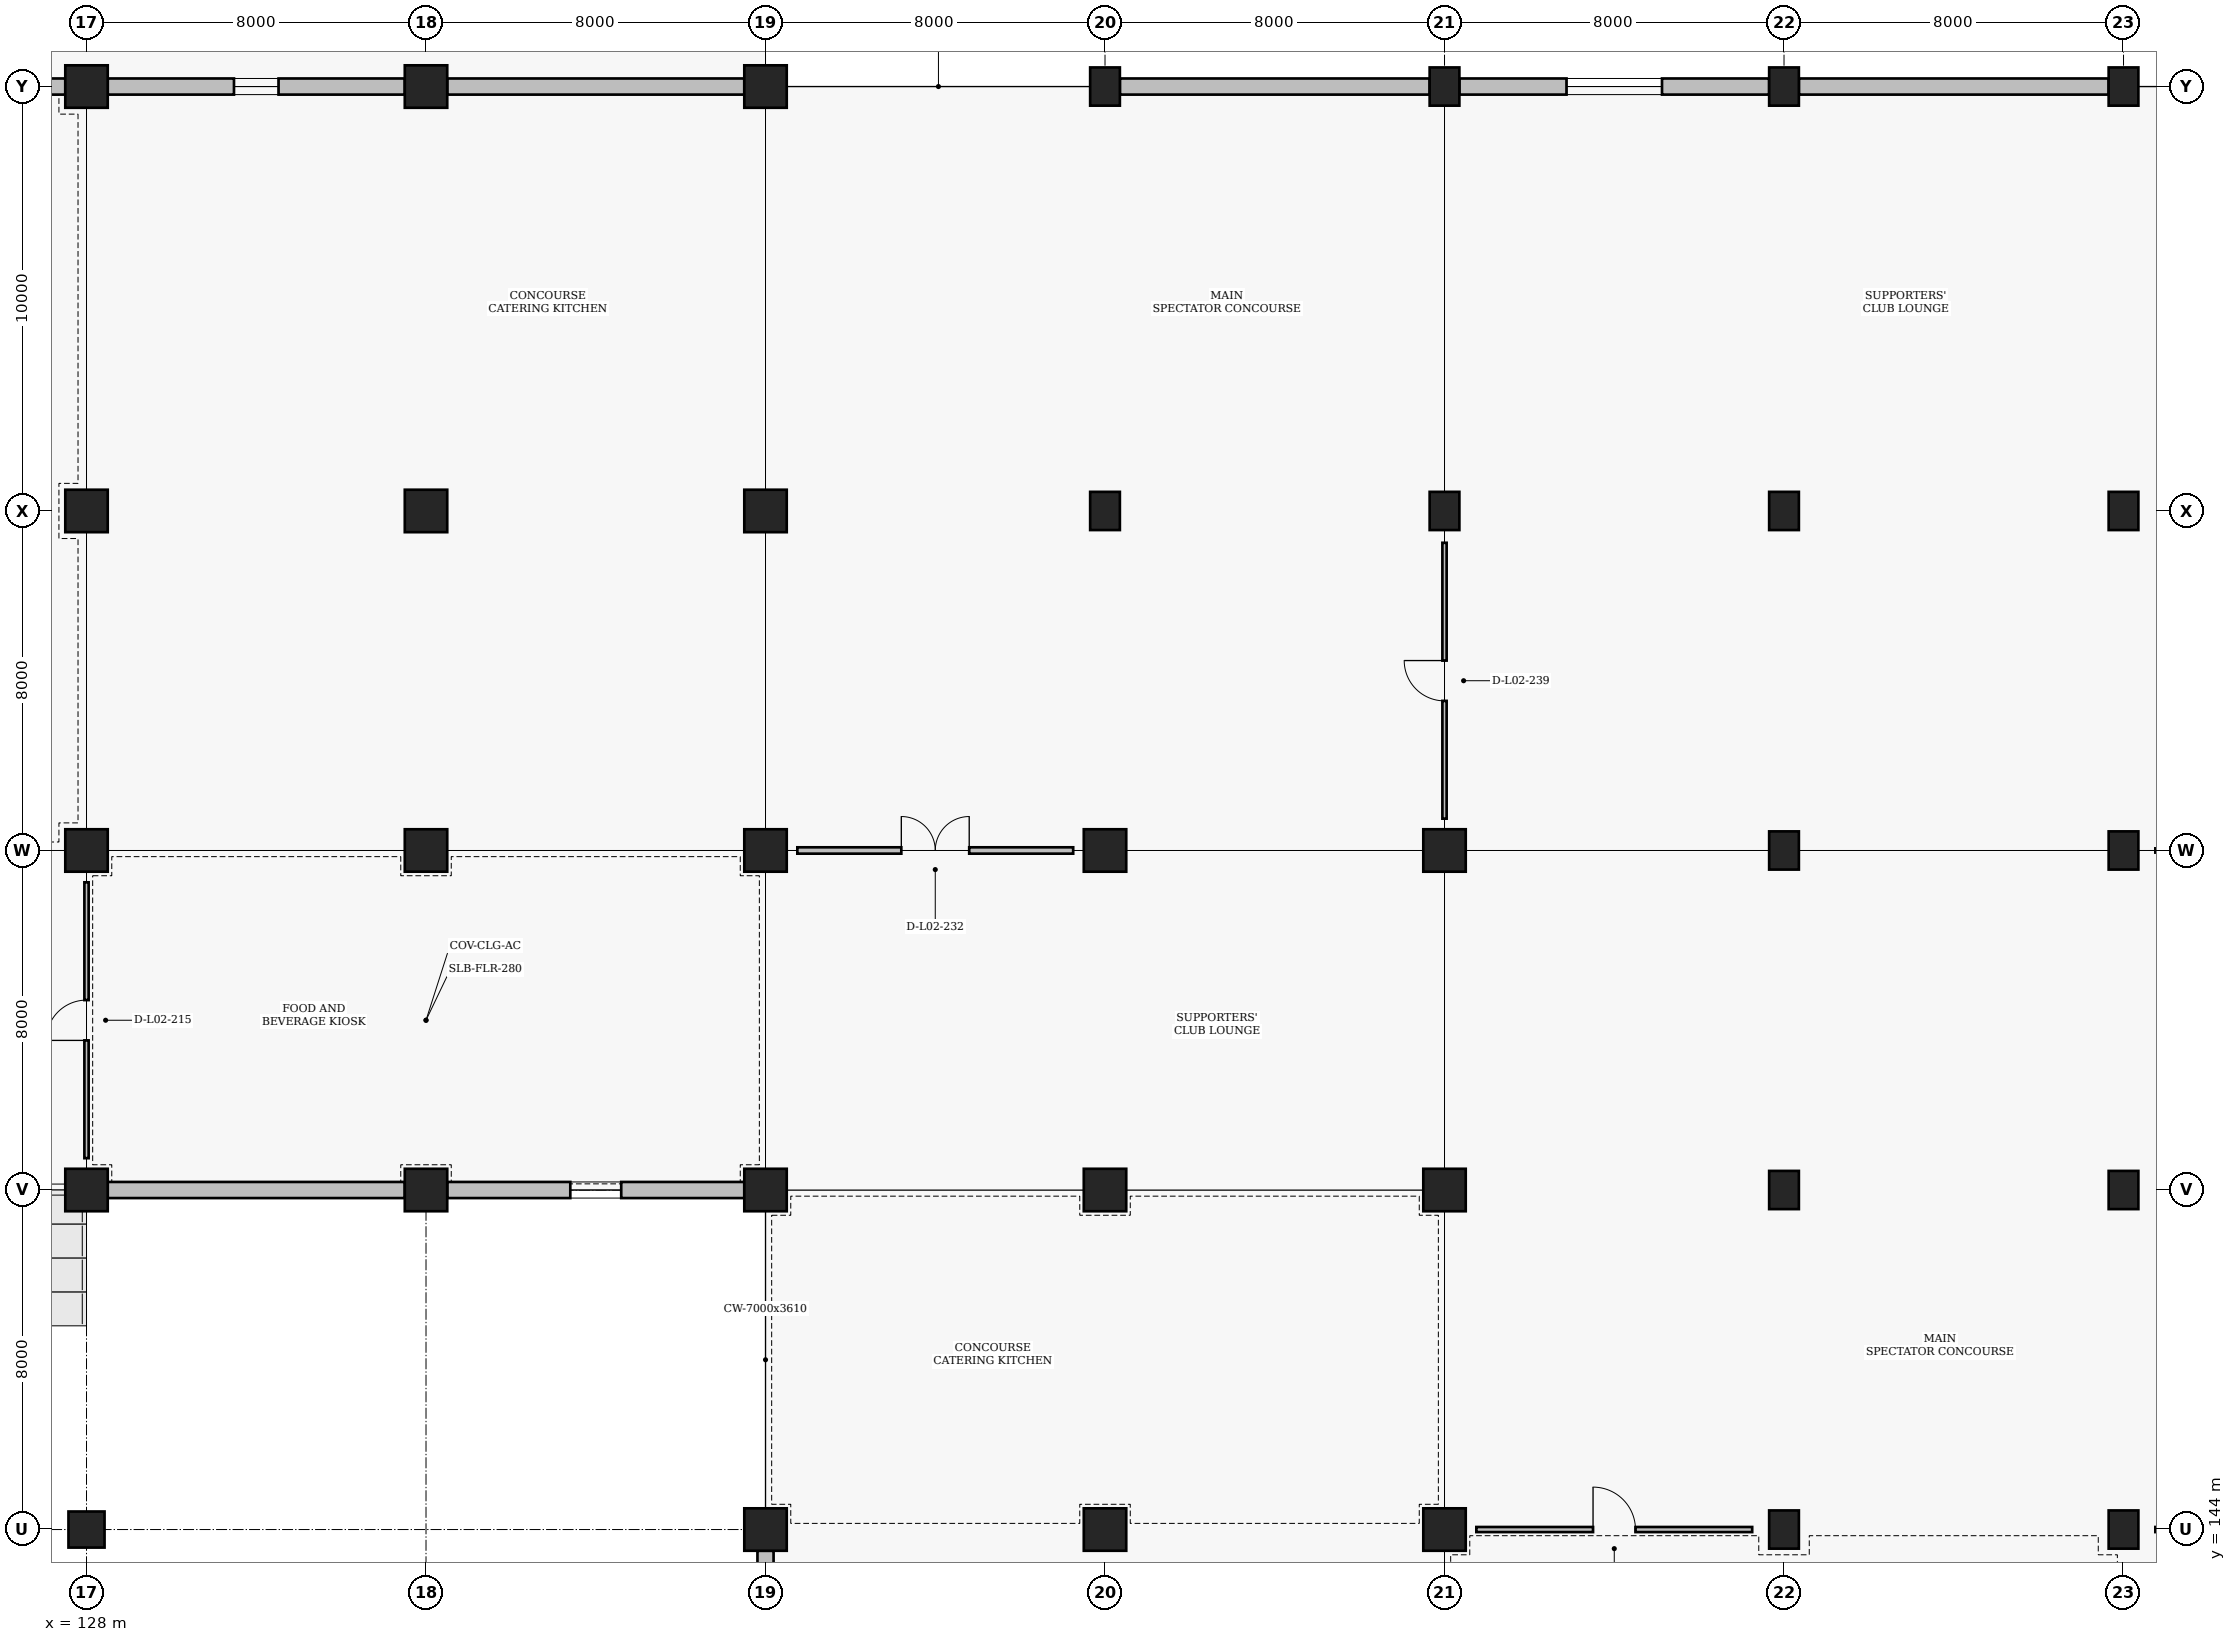
"""IFC4 building model, lengths in metres.
Left out: names, types, materials, properties, quantities, classifications, styles, units other than length and angle.
Written with IfcOpenShell. Run it as: python <this file> out.ifc"""

import sys

from ifc_helpers import new_model, si_unit, direction, frame, frame_2d, origin, origin_2d, place, context, subcontext, project, spatial, rectangle, circle, extrude, element, fill, save


model = new_model("IFC4")
c1 = context("Model", 3, precision=1e-05, world=origin(), true_north=direction((0.0, 1.0)))
c2 = subcontext(c1, "Body", "Model", "MODEL_VIEW")
j1 = project(units=[si_unit("LENGTHUNIT", "METRE"), si_unit("PLANEANGLEUNIT", "RADIAN")], contexts=[c1])
p1 = place(None, origin())
s1 = spatial("IfcSite", under=j1, at=p1, CompositionType="ELEMENT")
p2 = place(p1, origin())
s2 = spatial("IfcBuilding", under=s1, at=p2, CompositionType="ELEMENT")
p3 = place(p2, frame((0.0, 0.0, 4.8)))
s3 = spatial("IfcBuildingStorey", under=s2, at=p3, CompositionType="ELEMENT", Elevation=4.8)
for number, where, z_axis, x_axis in (
    (1, (128.0, 152.0, 0.0), (0.0, 0.0, 1.0), (1.0, 0.0, 0.0)),
    (2, (128.0, 160.0, 0.0), (0.0, 0.0, 1.0), (1.0, 0.0, 0.0)),
    (3, (128.0, 168.0, 0.0), (0.0, 0.0, 1.0), (1.0, 0.0, 0.0)),
    (4, (128.0, 178.0, 0.0), (0.0, 0.0, 1.0), (1.0, 0.0, 0.0)),
    (5, (136.0, 152.0, 0.0), (0.0, 0.0, 1.0), (1.0, 0.0, 0.0)),
    (6, (136.0, 160.0, 0.0), (0.0, 0.0, 1.0), (1.0, 0.0, 0.0)),
    (7, (136.0, 168.0, 0.0), (0.0, 0.0, 1.0), (1.0, 0.0, 0.0)),
    (8, (136.0, 178.0, 0.0), (0.0, 0.0, 1.0), (1.0, 0.0, 0.0)),
    (9, (144.0, 144.0, 0.0), (0.0, 0.0, 1.0), (1.0, 0.0, 0.0)),
    (10, (144.0, 152.0, 0.0), (0.0, 0.0, 1.0), (1.0, 0.0, 0.0)),
    (11, (144.0, 160.0, 0.0), (0.0, 0.0, 1.0), (1.0, 0.0, 0.0)),
    (12, (144.0, 168.0, 0.0), (0.0, 0.0, 1.0), (1.0, 0.0, 0.0)),
    (13, (144.0, 178.0, 0.0), (0.0, 0.0, 1.0), (1.0, 0.0, 0.0)),
    (14, (152.0, 144.0, 0.0), (0.0, 0.0, 1.0), (1.0, 0.0, 0.0)),
    (15, (152.0, 152.0, 0.0), (0.0, 0.0, 1.0), (1.0, 0.0, 0.0)),
    (16, (152.0, 160.0, 0.0), (0.0, 0.0, 1.0), (1.0, 0.0, 0.0)),
):
    element("IfcColumn", number, at=place(p3, frame(where, z_axis=z_axis, x_axis=x_axis)), inside=s3, PredefinedType="COLUMN", context=c2, shape_type="SweptSolid", body=[
        extrude(rectangle(XDim=1.0, YDim=1.0, at=origin_2d()), origin(), (0.0, 0.0, 1.0), 4.8),
    ])
for number, where, z_axis, x_axis in (
    (17, (152.0, 168.0, 0.0), (0.0, 0.0, 1.0), (1.0, 0.0, 0.0)),
    (18, (152.0, 178.0, 0.0), (0.0, 0.0, 1.0), (1.0, 0.0, 0.0)),
):
    element("IfcColumn", number, at=place(p3, frame(where, z_axis=z_axis, x_axis=x_axis)), inside=s3, PredefinedType="COLUMN", context=c2, shape_type="SweptSolid", body=[
        extrude(rectangle(XDim=0.7, YDim=0.9, at=origin_2d()), origin(), (0.0, 0.0, 1.0), 4.8),
    ])
for number, where, z_axis, x_axis in (
    (19, (160.0, 144.0, 0.0), (0.0, 0.0, 1.0), (1.0, 0.0, 0.0)),
    (20, (160.0, 152.0, 0.0), (0.0, 0.0, 1.0), (1.0, 0.0, 0.0)),
    (21, (160.0, 160.0, 0.0), (0.0, 0.0, 1.0), (1.0, 0.0, 0.0)),
):
    element("IfcColumn", number, at=place(p3, frame(where, z_axis=z_axis, x_axis=x_axis)), inside=s3, PredefinedType="COLUMN", context=c2, shape_type="SweptSolid", body=[
        extrude(rectangle(XDim=1.0, YDim=1.0, at=origin_2d()), origin(), (0.0, 0.0, 1.0), 4.8),
    ])
for number, where, z_axis, x_axis in (
    (22, (160.0, 168.0, 0.0), (0.0, 0.0, 1.0), (1.0, 0.0, 0.0)),
    (23, (160.0, 178.0, 0.0), (0.0, 0.0, 1.0), (1.0, 0.0, 0.0)),
    (24, (168.0, 144.0, 0.0), (0.0, 0.0, 1.0), (1.0, 0.0, 0.0)),
    (25, (168.0, 152.0, 0.0), (0.0, 0.0, 1.0), (1.0, 0.0, 0.0)),
    (26, (168.0, 160.0, 0.0), (0.0, 0.0, 1.0), (1.0, 0.0, 0.0)),
    (27, (168.0, 168.0, 0.0), (0.0, 0.0, 1.0), (1.0, 0.0, 0.0)),
    (28, (168.0, 178.0, 0.0), (0.0, 0.0, 1.0), (1.0, 0.0, 0.0)),
    (29, (176.0, 144.0, 0.0), (0.0, 0.0, 1.0), (1.0, 0.0, 0.0)),
    (30, (176.0, 152.0, 0.0), (0.0, 0.0, 1.0), (1.0, 0.0, 0.0)),
    (31, (176.0, 160.0, 0.0), (0.0, 0.0, 1.0), (1.0, 0.0, 0.0)),
    (32, (176.0, 168.0, 0.0), (0.0, 0.0, 1.0), (1.0, 0.0, 0.0)),
    (33, (176.0, 178.0, 0.0), (0.0, 0.0, 1.0), (1.0, 0.0, 0.0)),
):
    element("IfcColumn", number, at=place(p3, frame(where, z_axis=z_axis, x_axis=x_axis)), inside=s3, PredefinedType="COLUMN", context=c2, shape_type="SweptSolid", body=[
        extrude(rectangle(XDim=0.7, YDim=0.9, at=origin_2d()), origin(), (0.0, 0.0, 1.0), 4.8),
    ])
p4 = place(p3, frame((128.0, 144.0, 0.0), z_axis=(0.0, 0.0, 1.0), x_axis=(1.0, 0.0, 0.0)))
e34 = element("IfcColumn", 34, at=p4, inside=s3, PredefinedType="COLUMN", context=c2, shape_type="SweptSolid", body=[
    extrude(circle(Radius=0.425, at=origin_2d()), origin(), (0.0, 0.0, 1.0), 4.8),
])
p5 = place(p3, frame((120.5, 178.0, 0.0), z_axis=(0.0, 0.0, 1.0), x_axis=(1.0, 0.0, 0.0)))
e35 = element("IfcWall", 35, at=p5, inside=s3, PredefinedType="SOLIDWALL", context=c2, shape_type="SweptSolid", body=[
    extrude(rectangle(XDim=7.0, YDim=0.38, at=frame_2d((3.5, 0.0))), origin(), (0.0, 0.0, 1.0), 3.77),
])
p6 = place(p3, frame((128.5, 152.0, 0.0), z_axis=(0.0, 0.0, 1.0), x_axis=(1.0, 0.0, 0.0)))
e36 = element("IfcWall", 36, at=p6, inside=s3, PredefinedType="SOLIDWALL", context=c2, shape_type="SweptSolid", body=[
    extrude(rectangle(XDim=7.0, YDim=0.38, at=frame_2d((3.5, 0.0))), origin(), (0.0, 0.0, 1.0), 3.91),
])
p7 = place(p3, frame((128.5, 178.0, 0.0), z_axis=(0.0, 0.0, 1.0), x_axis=(1.0, 0.0, 0.0)))
e37 = element("IfcWall", 37, at=p7, inside=s3, PredefinedType="SOLIDWALL", context=c2, shape_type="SweptSolid", body=[
    extrude(rectangle(XDim=7.0, YDim=0.38, at=frame_2d((3.5, 0.0))), origin(), (0.0, 0.0, 1.0), 3.77),
])
p8 = place(p7, frame((2.975, 0.0, 0.95)))
e38 = element("IfcOpeningElement", 38, at=p8, cuts=e37, PredefinedType="OPENING", context=c2, shape_type="SweptSolid", body=[
    extrude(rectangle(XDim=1.05, YDim=1.5, at=frame_2d((0.525, 0.75))), frame((0.0, 0.2, 0.0), z_axis=(0.0, -1.0, 0.0), x_axis=(1.0, 0.0, 0.0)), (0.0, 0.0, 1.0), 0.4),
])
p9 = place(p3, frame((136.5, 152.0, 0.0), z_axis=(0.0, 0.0, 1.0), x_axis=(1.0, 0.0, 0.0)))
e39 = element("IfcWall", 39, at=p9, inside=s3, PredefinedType="SOLIDWALL", context=c2, shape_type="SweptSolid", body=[
    extrude(rectangle(XDim=7.0, YDim=0.38, at=frame_2d((3.5, 0.0))), origin(), (0.0, 0.0, 1.0), 3.91),
])
p10 = place(p9, frame((2.9, 0.0, 0.95)))
e40 = element("IfcOpeningElement", 40, at=p10, cuts=e39, PredefinedType="OPENING", context=c2, shape_type="SweptSolid", body=[
    extrude(rectangle(XDim=1.2, YDim=1.5, at=frame_2d((0.6, 0.75))), frame((0.0, 0.2, 0.0), z_axis=(0.0, -1.0, 0.0), x_axis=(1.0, 0.0, 0.0)), (0.0, 0.0, 1.0), 0.4),
])
p11 = place(p3, frame((136.5, 178.0, 0.0), z_axis=(0.0, 0.0, 1.0), x_axis=(1.0, 0.0, 0.0)))
e41 = element("IfcWall", 41, at=p11, inside=s3, PredefinedType="SOLIDWALL", context=c2, shape_type="SweptSolid", body=[
    extrude(rectangle(XDim=7.0, YDim=0.38, at=frame_2d((3.5, 0.0))), origin(), (0.0, 0.0, 1.0), 3.77),
])
p12 = place(p3, frame((144.0, 136.5, 0.0), z_axis=(0.0, 0.0, 1.0), x_axis=(0.0, 1.0, 0.0)))
e42 = element("IfcWall", 42, at=p12, inside=s3, PredefinedType="SOLIDWALL", context=c2, shape_type="SweptSolid", body=[
    extrude(rectangle(XDim=7.0, YDim=0.38, at=frame_2d((3.5, 0.0))), origin(), (0.0, 0.0, 1.0), 3.61),
])
p13 = place(p3, frame((152.35, 178.0, 0.0), z_axis=(0.0, 0.0, 1.0), x_axis=(1.0, 0.0, 0.0)))
e43 = element("IfcWall", 43, at=p13, inside=s3, PredefinedType="SOLIDWALL", context=c2, shape_type="SweptSolid", body=[
    extrude(rectangle(XDim=7.3, YDim=0.38, at=frame_2d((3.65, 0.0))), origin(), (0.0, 0.0, 1.0), 3.71),
])
p14 = place(p3, frame((160.35, 178.0, 0.0), z_axis=(0.0, 0.0, 1.0), x_axis=(1.0, 0.0, 0.0)))
e44 = element("IfcWall", 44, at=p14, inside=s3, PredefinedType="SOLIDWALL", context=c2, shape_type="SweptSolid", body=[
    extrude(rectangle(XDim=7.3, YDim=0.38, at=frame_2d((3.65, 0.0))), origin(), (0.0, 0.0, 1.0), 3.71),
])
p15 = place(p14, frame((2.525, 0.0, 0.95)))
e45 = element("IfcOpeningElement", 45, at=p15, cuts=e44, PredefinedType="OPENING", context=c2, shape_type="SweptSolid", body=[
    extrude(rectangle(XDim=2.25, YDim=1.9, at=frame_2d((1.125, 0.95))), frame((0.0, 0.2, 0.0), z_axis=(0.0, -1.0, 0.0), x_axis=(1.0, 0.0, 0.0)), (0.0, 0.0, 1.0), 0.4),
])
p16 = place(p3, frame((168.35, 178.0, 0.0), z_axis=(0.0, 0.0, 1.0), x_axis=(1.0, 0.0, 0.0)))
e46 = element("IfcWall", 46, at=p16, inside=s3, PredefinedType="SOLIDWALL", context=c2, shape_type="SweptSolid", body=[
    extrude(rectangle(XDim=7.3, YDim=0.38, at=frame_2d((3.65, 0.0))), origin(), (0.0, 0.0, 1.0), 3.71),
])
p17 = place(p3, frame((128.0, 152.75, 0.0), z_axis=(0.0, 0.0, 1.0), x_axis=(0.0, 1.0, 0.0)))
e47 = element("IfcWall", 47, at=p17, inside=s3, PredefinedType="PARTITIONING", context=c2, shape_type="SweptSolid", body=[
    extrude(rectangle(XDim=6.5, YDim=0.1, at=frame_2d((3.25, 0.0))), origin(), (0.0, 0.0, 1.0), 3.91),
])
p18 = place(p17, frame((2.775, 0.0, 0.0)))
e48 = element("IfcOpeningElement", 48, at=p18, cuts=e47, PredefinedType="OPENING", context=c2, shape_type="SweptSolid", body=[
    extrude(rectangle(XDim=0.95, YDim=2.1, at=frame_2d((0.475, 1.05))), frame((0.0, 0.06, 0.0), z_axis=(0.0, -1.0, 0.0), x_axis=(1.0, 0.0, 0.0)), (0.0, 0.0, 1.0), 0.12),
])
p19 = place(p3, frame((144.75, 160.0, 0.0), z_axis=(0.0, 0.0, 1.0), x_axis=(1.0, 0.0, 0.0)))
e49 = element("IfcWall", 49, at=p19, inside=s3, PredefinedType="PARTITIONING", context=c2, shape_type="SweptSolid", body=[
    extrude(rectangle(XDim=6.5, YDim=0.15, at=frame_2d((3.25, 0.0))), origin(), (0.0, 0.0, 1.0), 3.97),
])
p20 = place(p19, frame((2.45, 0.0, 0.0)))
e50 = element("IfcOpeningElement", 50, at=p20, cuts=e49, PredefinedType="OPENING", context=c2, shape_type="SweptSolid", body=[
    extrude(rectangle(XDim=1.6, YDim=2.2, at=frame_2d((0.8, 1.1))), frame((0.0, 0.085, 0.0), z_axis=(0.0, -1.0, 0.0), x_axis=(1.0, 0.0, 0.0)), (0.0, 0.0, 1.0), 0.17),
])
p21 = place(p3, frame((160.75, 144.0, 0.0), z_axis=(0.0, 0.0, 1.0), x_axis=(1.0, 0.0, 0.0)))
e51 = element("IfcWall", 51, at=p21, inside=s3, PredefinedType="PARTITIONING", context=c2, shape_type="SweptSolid", body=[
    extrude(rectangle(XDim=6.5, YDim=0.12, at=frame_2d((3.25, 0.0))), origin(), (0.0, 0.0, 1.0), 3.91),
])
p22 = place(p21, frame((2.75, 0.0, 0.0)))
e52 = element("IfcOpeningElement", 52, at=p22, cuts=e51, PredefinedType="OPENING", context=c2, shape_type="SweptSolid", body=[
    extrude(rectangle(XDim=1.0, YDim=2.1, at=frame_2d((0.5, 1.05))), frame((0.0, 0.07, 0.0), z_axis=(0.0, -1.0, 0.0), x_axis=(1.0, 0.0, 0.0)), (0.0, 0.0, 1.0), 0.14),
])
p23 = place(p3, frame((160.0, 160.75, 0.0), z_axis=(0.0, 0.0, 1.0), x_axis=(0.0, 1.0, 0.0)))
e53 = element("IfcWall", 53, at=p23, inside=s3, PredefinedType="PARTITIONING", context=c2, shape_type="SweptSolid", body=[
    extrude(rectangle(XDim=6.5, YDim=0.1, at=frame_2d((3.25, 0.0))), origin(), (0.0, 0.0, 1.0), 3.91),
])
p24 = place(p23, frame((2.775, 0.0, 0.0)))
e54 = element("IfcOpeningElement", 54, at=p24, cuts=e53, PredefinedType="OPENING", context=c2, shape_type="SweptSolid", body=[
    extrude(rectangle(XDim=0.95, YDim=2.1, at=frame_2d((0.475, 1.05))), frame((0.0, 0.06, 0.0), z_axis=(0.0, -1.0, 0.0), x_axis=(1.0, 0.0, 0.0)), (0.0, 0.0, 1.0), 0.12),
])
p25 = place(p3, frame((176.75, 144.0, 0.0), z_axis=(0.0, 0.0, 1.0), x_axis=(1.0, 0.0, 0.0)))
e55 = element("IfcWall", 55, at=p25, inside=s3, PredefinedType="PARTITIONING", context=c2, shape_type="SweptSolid", body=[
    extrude(rectangle(XDim=6.5, YDim=0.12, at=frame_2d((3.25, 0.0))), origin(), (0.0, 0.0, 1.0), 3.91),
])
p26 = place(p25, frame((2.75, 0.0, 0.0)))
e56 = element("IfcOpeningElement", 56, at=p26, cuts=e55, PredefinedType="OPENING", context=c2, shape_type="SweptSolid", body=[
    extrude(rectangle(XDim=1.0, YDim=2.1, at=frame_2d((0.5, 1.05))), frame((0.0, 0.07, 0.0), z_axis=(0.0, -1.0, 0.0), x_axis=(1.0, 0.0, 0.0)), (0.0, 0.0, 1.0), 0.14),
])
p27 = place(p3, frame((176.75, 160.0, 0.0), z_axis=(0.0, 0.0, 1.0), x_axis=(1.0, 0.0, 0.0)))
e57 = element("IfcWall", 57, at=p27, inside=s3, PredefinedType="PARTITIONING", context=c2, shape_type="SweptSolid", body=[
    extrude(rectangle(XDim=6.5, YDim=0.1, at=frame_2d((3.25, 0.0))), origin(), (0.0, 0.0, 1.0), 3.61),
])
p28 = place(p27, frame((2.775, 0.0, 0.0)))
e58 = element("IfcOpeningElement", 58, at=p28, cuts=e57, PredefinedType="OPENING", context=c2, shape_type="SweptSolid", body=[
    extrude(rectangle(XDim=0.95, YDim=2.1, at=frame_2d((0.475, 1.05))), frame((0.0, 0.06, 0.0), z_axis=(0.0, -1.0, 0.0), x_axis=(1.0, 0.0, 0.0)), (0.0, 0.0, 1.0), 0.12),
])
p29 = place(p8, origin())
e59 = element("IfcWindow", 59, at=p29, inside=s3, PartitioningType="SINGLE_PANEL", PredefinedType="WINDOW", context=c2, shape_type="SweptSolid", body=[
    extrude(rectangle(XDim=1.05, YDim=1.5, at=frame_2d((0.525, 0.75))), frame((0.0, 0.03, 0.0), z_axis=(0.0, -1.0, 0.0), x_axis=(1.0, 0.0, 0.0)), (0.0, 0.0, 1.0), 0.06),
])
fill(e38, e59)
p30 = place(p10, origin())
e60 = element("IfcWindow", 60, at=p30, inside=s3, PartitioningType="SINGLE_PANEL", PredefinedType="WINDOW", context=c2, shape_type="SweptSolid", body=[
    extrude(rectangle(XDim=1.2, YDim=1.5, at=frame_2d((0.6, 0.75))), frame((0.0, 0.03, 0.0), z_axis=(0.0, -1.0, 0.0), x_axis=(1.0, 0.0, 0.0)), (0.0, 0.0, 1.0), 0.06),
])
fill(e40, e60)
p31 = place(p15, origin())
e61 = element("IfcWindow", 61, at=p31, inside=s3, PartitioningType="SINGLE_PANEL", PredefinedType="WINDOW", context=c2, shape_type="SweptSolid", body=[
    extrude(rectangle(XDim=2.25, YDim=1.9, at=frame_2d((1.125, 0.95))), frame((0.0, 0.03, 0.0), z_axis=(0.0, -1.0, 0.0), x_axis=(1.0, 0.0, 0.0)), (0.0, 0.0, 1.0), 0.06),
])
fill(e45, e61)
p32 = place(p18, origin())
e62 = element("IfcDoor", 62, at=p32, inside=s3, OperationType="SINGLE_SWING_LEFT", PredefinedType="DOOR", context=c2, shape_type="SweptSolid", body=[
    extrude(rectangle(XDim=0.95, YDim=2.1, at=frame_2d((0.475, 1.05))), frame((0.0, 0.025, 0.0), z_axis=(0.0, -1.0, 0.0), x_axis=(1.0, 0.0, 0.0)), (0.0, 0.0, 1.0), 0.05),
])
fill(e48, e62)
p33 = place(p20, origin())
e63 = element("IfcDoor", 63, at=p33, inside=s3, OperationType="DOUBLE_SWING_LEFT", PredefinedType="DOOR", context=c2, shape_type="SweptSolid", body=[
    extrude(rectangle(XDim=1.6, YDim=2.2, at=frame_2d((0.8, 1.1))), frame((0.0, 0.025, 0.0), z_axis=(0.0, -1.0, 0.0), x_axis=(1.0, 0.0, 0.0)), (0.0, 0.0, 1.0), 0.05),
])
fill(e50, e63)
p34 = place(p22, origin())
e64 = element("IfcDoor", 64, at=p34, inside=s3, OperationType="SINGLE_SWING_LEFT", PredefinedType="DOOR", context=c2, shape_type="SweptSolid", body=[
    extrude(rectangle(XDim=1.0, YDim=2.1, at=frame_2d((0.5, 1.05))), frame((0.0, 0.025, 0.0), z_axis=(0.0, -1.0, 0.0), x_axis=(1.0, 0.0, 0.0)), (0.0, 0.0, 1.0), 0.05),
])
fill(e52, e64)
p35 = place(p24, origin())
e65 = element("IfcDoor", 65, at=p35, inside=s3, OperationType="SINGLE_SWING_RIGHT", PredefinedType="DOOR", context=c2, shape_type="SweptSolid", body=[
    extrude(rectangle(XDim=0.95, YDim=2.1, at=frame_2d((0.475, 1.05))), frame((0.0, 0.025, 0.0), z_axis=(0.0, -1.0, 0.0), x_axis=(1.0, 0.0, 0.0)), (0.0, 0.0, 1.0), 0.05),
])
fill(e54, e65)
save(model, sys.argv[1])
